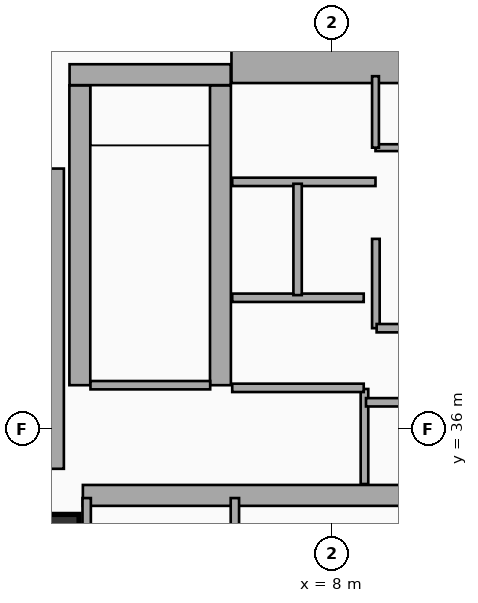
"""IFC4 building model, lengths in metres.
Left out: names, types, materials, properties, quantities, classifications, styles, units other than length and angle.
Written with IfcOpenShell. Run it as: python <this file> out.ifc"""

import sys

from ifc_helpers import new_model, si_unit, direction, frame, frame_2d, origin, origin_2d, place, context, subcontext, project, spatial, rectangle, extrude, element, fill, save


model = new_model("IFC4")
c1 = context("Model", 3, precision=1e-05, world=origin(), true_north=direction((0.0, 1.0)))
c2 = subcontext(c1, "Body", "Model", "MODEL_VIEW")
j1 = project(units=[si_unit("LENGTHUNIT", "METRE"), si_unit("PLANEANGLEUNIT", "RADIAN")], contexts=[c1])
p1 = place(None, origin())
s1 = spatial("IfcSite", under=j1, at=p1, CompositionType="ELEMENT")
p2 = place(p1, origin())
s2 = spatial("IfcBuilding", under=s1, at=p2, CompositionType="ELEMENT")
p3 = place(p2, origin())
s3 = spatial("IfcBuildingStorey", under=s2, at=p3, CompositionType="ELEMENT", Elevation=0.0)
p4 = place(p3, frame((5.36, 45.55, 0.0), z_axis=(0.0, 0.0, 1.0), x_axis=(1.0, 0.0, 0.0)))
e1 = element("IfcWall", 1, at=p4, inside=s3, PredefinedType="SHEAR", context=c2, shape_type="SweptSolid", body=[
    extrude(rectangle(XDim=13.98, YDim=0.9, at=frame_2d((6.99, 0.0))), origin(), (0.0, 0.0, 1.0), 5.94),
])
p5 = place(p3, frame((0.5, 34.95, 0.0), z_axis=(0.0, 0.0, 1.0), x_axis=(0.0, 1.0, 0.0)))
e2 = element("IfcWall", 2, at=p5, inside=s3, PredefinedType="SHEAR", context=c2, shape_type="SweptSolid", body=[
    extrude(rectangle(XDim=7.9, YDim=0.9, at=frame_2d((3.95, 0.0))), origin(), (0.0, 0.0, 1.0), 5.94),
])
p6 = place(p3, frame((1.45, 34.25, 0.0), z_axis=(0.0, 0.0, 1.0), x_axis=(1.0, 0.0, 0.0)))
e3 = element("IfcWall", 3, at=p6, inside=s3, PredefinedType="SHEAR", context=c2, shape_type="SweptSolid", body=[
    extrude(rectangle(XDim=10.71, YDim=0.55, at=frame_2d((5.355, 0.0))), origin(), (0.0, 0.0, 1.0), 5.94),
])
p7 = place(p6, frame((7.25, 0.0, 0.0), z_axis=(0.0, 0.0, 1.0), x_axis=(-1.0, 0.0, 0.0)))
e4 = element("IfcOpeningElement", 4, at=p7, cuts=e3, PredefinedType="OPENING", context=c2, shape_type="SweptSolid", body=[
    extrude(rectangle(XDim=1.1, YDim=2.15, at=frame_2d((0.55, 1.075))), frame((0.0, 0.285, 0.0), z_axis=(0.0, -1.0, 0.0), x_axis=(1.0, 0.0, 0.0)), (0.0, 0.0, 1.0), 0.57),
])
for number, where, z_axis, x_axis in (
    (5, (1.37, 37.15, 0.0), (0.0, 0.0, 1.0), (0.0, 1.0, 0.0)),
    (6, (5.07, 37.15, 0.0), (0.0, 0.0, 1.0), (0.0, 1.0, 0.0)),
):
    element("IfcWall", number, at=place(p3, frame(where, z_axis=z_axis, x_axis=x_axis)), inside=s3, PredefinedType="SHEAR", context=c2, shape_type="SweptSolid", body=[
        extrude(rectangle(XDim=7.89, YDim=0.55, at=frame_2d((3.945, 0.0))), origin(), (0.0, 0.0, 1.0), 5.94),
    ])
p8 = place(p3, frame((1.1, 45.32, 0.0), z_axis=(0.0, 0.0, 1.0), x_axis=(1.0, 0.0, 0.0)))
e7 = element("IfcWall", 7, at=p8, inside=s3, PredefinedType="SHEAR", context=c2, shape_type="SweptSolid", body=[
    extrude(rectangle(XDim=4.24, YDim=0.55, at=frame_2d((2.12, 0.0))), origin(), (0.0, 0.0, 1.0), 5.94),
])
p9 = place(p3, frame((0.8, 33.2, 0.0), z_axis=(0.0, 0.0, 1.0), x_axis=(1.0, 0.0, 0.0)))
e8 = element("IfcColumn", 8, at=p9, inside=s3, PredefinedType="COLUMN", context=c2, shape_type="SweptSolid", body=[
    extrude(rectangle(XDim=1.1, YDim=1.1, at=origin_2d()), origin(), (0.0, 0.0, 1.0), 5.94),
])
p10 = place(p3, frame((1.088, 47.834, 0.0), z_axis=(0.0, 0.0, 1.0), x_axis=(-0.707106781187, -0.707106781187, 0.0)))
e9 = element("IfcWall", 9, at=p10, inside=s3, PredefinedType="SOLIDWALL", context=c2, shape_type="SweptSolid", body=[
    extrude(rectangle(XDim=4.133, YDim=0.36, at=frame_2d((2.066, 0.0))), origin(), (0.0, 0.0, 1.0), 5.62),
])
p11 = place(p3, frame((1.65, 37.15, 0.0), z_axis=(0.0, 0.0, 1.0), x_axis=(1.0, 0.0, 0.0)))
e10 = element("IfcWall", 10, at=p11, inside=s3, PredefinedType="PARTITIONING", context=c2, shape_type="SweptSolid", body=[
    extrude(rectangle(XDim=3.15, YDim=0.22, at=frame_2d((1.575, 0.0))), origin(), (0.0, 0.0, 1.0), 5.62),
])
p12 = place(p11, frame((2.05, 0.0, 0.0), z_axis=(0.0, 0.0, 1.0), x_axis=(-1.0, 0.0, 0.0)))
e11 = element("IfcOpeningElement", 11, at=p12, cuts=e10, PredefinedType="OPENING", context=c2, shape_type="SweptSolid", body=[
    extrude(rectangle(XDim=1.05, YDim=2.15, at=frame_2d((0.525, 1.075))), frame((0.0, 0.12, 0.0), z_axis=(0.0, -1.0, 0.0), x_axis=(1.0, 0.0, 0.0)), (0.0, 0.0, 1.0), 0.24),
])
p13 = place(p3, frame((8.86, 34.55, 0.0), z_axis=(0.0, 0.0, 1.0), x_axis=(0.0, 1.0, 0.0)))
e12 = element("IfcWall", 12, at=p13, inside=s3, PredefinedType="PARTITIONING", context=c2, shape_type="SweptSolid", body=[
    extrude(rectangle(XDim=2.5, YDim=0.2, at=frame_2d((1.25, 0.0))), origin(), (0.0, 0.0, 1.0), 5.62),
])
p14 = place(p3, frame((5.38, 37.08, 0.0), z_axis=(0.0, 0.0, 1.0), x_axis=(1.0, 0.0, 0.0)))
e13 = element("IfcWall", 13, at=p14, inside=s3, PredefinedType="PARTITIONING", context=c2, shape_type="SweptSolid", body=[
    extrude(rectangle(XDim=3.46, YDim=0.22, at=frame_2d((1.73, 0.0))), origin(), (0.0, 0.0, 1.0), 5.62),
])
p15 = place(p14, frame((1.55, 0.0, 0.0), z_axis=(0.0, 0.0, 1.0), x_axis=(-1.0, 0.0, 0.0)))
e14 = element("IfcOpeningElement", 14, at=p15, cuts=e13, PredefinedType="OPENING", context=c2, shape_type="SweptSolid", body=[
    extrude(rectangle(XDim=1.2, YDim=2.2, at=frame_2d((0.6, 1.1))), frame((0.0, 0.12, 0.0), z_axis=(0.0, -1.0, 0.0), x_axis=(1.0, 0.0, 0.0)), (0.0, 0.0, 1.0), 0.24),
])
p16 = place(p14, frame((3.22, 0.0, 0.0), z_axis=(0.0, 0.0, 1.0), x_axis=(-1.0, 0.0, 0.0)))
e15 = element("IfcOpeningElement", 15, at=p16, cuts=e13, PredefinedType="OPENING", context=c2, shape_type="SweptSolid", body=[
    extrude(rectangle(XDim=1.2, YDim=2.2, at=frame_2d((0.6, 1.1))), frame((0.0, 0.12, 0.0), z_axis=(0.0, -1.0, 0.0), x_axis=(1.0, 0.0, 0.0)), (0.0, 0.0, 1.0), 0.24),
])
p17 = place(p3, frame((5.38, 39.45, 0.0), z_axis=(0.0, 0.0, 1.0), x_axis=(1.0, 0.0, 0.0)))
e16 = element("IfcWall", 16, at=p17, inside=s3, PredefinedType="PARTITIONING", context=c2, shape_type="SweptSolid", body=[
    extrude(rectangle(XDim=3.46, YDim=0.22, at=frame_2d((1.73, 0.0))), origin(), (0.0, 0.0, 1.0), 5.62),
])
p18 = place(p3, frame((5.38, 42.5, 0.0), z_axis=(0.0, 0.0, 1.0), x_axis=(1.0, 0.0, 0.0)))
e17 = element("IfcWall", 17, at=p18, inside=s3, PredefinedType="PARTITIONING", context=c2, shape_type="SweptSolid", body=[
    extrude(rectangle(XDim=3.77, YDim=0.22, at=frame_2d((1.885, 0.0))), origin(), (0.0, 0.0, 1.0), 5.62),
])
p19 = place(p18, frame((1.75, 0.0, 0.0), z_axis=(0.0, 0.0, 1.0), x_axis=(-1.0, 0.0, 0.0)))
e18 = element("IfcOpeningElement", 18, at=p19, cuts=e17, PredefinedType="OPENING", context=c2, shape_type="SweptSolid", body=[
    extrude(rectangle(XDim=1.4, YDim=2.2, at=frame_2d((0.7, 1.1))), frame((0.0, 0.12, 0.0), z_axis=(0.0, -1.0, 0.0), x_axis=(1.0, 0.0, 0.0)), (0.0, 0.0, 1.0), 0.24),
])
p20 = place(p18, frame((3.53, 0.0, 0.0), z_axis=(0.0, 0.0, 1.0), x_axis=(-1.0, 0.0, 0.0)))
e19 = element("IfcOpeningElement", 19, at=p20, cuts=e17, PredefinedType="OPENING", context=c2, shape_type="SweptSolid", body=[
    extrude(rectangle(XDim=1.4, YDim=2.2, at=frame_2d((0.7, 1.1))), frame((0.0, 0.12, 0.0), z_axis=(0.0, -1.0, 0.0), x_axis=(1.0, 0.0, 0.0)), (0.0, 0.0, 1.0), 0.24),
])
p21 = place(p3, frame((7.1, 39.52, 0.0), z_axis=(0.0, 0.0, 1.0), x_axis=(0.0, 1.0, 0.0)))
e20 = element("IfcWall", 20, at=p21, inside=s3, PredefinedType="PARTITIONING", context=c2, shape_type="SweptSolid", body=[
    extrude(rectangle(XDim=2.93, YDim=0.22, at=frame_2d((1.465, 0.0))), origin(), (0.0, 0.0, 1.0), 5.62),
])
p22 = place(p21, frame((0.85, 0.0, 0.0)))
e21 = element("IfcOpeningElement", 21, at=p22, cuts=e20, PredefinedType="OPENING", context=c2, shape_type="SweptSolid", body=[
    extrude(rectangle(XDim=1.1, YDim=2.2, at=frame_2d((0.55, 1.1))), frame((0.0, 0.12, 0.0), z_axis=(0.0, -1.0, 0.0), x_axis=(1.0, 0.0, 0.0)), (0.0, 0.0, 1.0), 0.24),
])
for number, where, z_axis, x_axis in (
    (22, (1.55, 31.8, 0.0), (0.0, 0.0, 1.0), (0.0, 1.0, 0.0)),
    (23, (5.45, 31.8, 0.0), (0.0, 0.0, 1.0), (0.0, 1.0, 0.0)),
):
    element("IfcWall", number, at=place(p3, frame(where, z_axis=z_axis, x_axis=x_axis)), inside=s3, PredefinedType="PARTITIONING", context=c2, shape_type="SweptSolid", body=[
        extrude(rectangle(XDim=2.38, YDim=0.22, at=frame_2d((1.19, 0.0))), origin(), (0.0, 0.0, 1.0), 5.62),
    ])
p23 = place(p3, frame((9.16, 38.65, 0.0), z_axis=(0.0, 0.0, 1.0), x_axis=(0.0, 1.0, 0.0)))
e24 = element("IfcWall", 24, at=p23, inside=s3, PredefinedType="PARTITIONING", context=c2, shape_type="SweptSolid", body=[
    extrude(rectangle(XDim=2.35, YDim=0.2, at=frame_2d((1.175, 0.0))), origin(), (0.0, 0.0, 1.0), 5.62),
])
p24 = place(p3, frame((8.9, 36.7, 0.0), z_axis=(0.0, 0.0, 1.0), x_axis=(1.0, 0.0, 0.0)))
e25 = element("IfcWall", 25, at=p24, inside=s3, PredefinedType="PARTITIONING", context=c2, shape_type="SweptSolid", body=[
    extrude(rectangle(XDim=3.26, YDim=0.22, at=frame_2d((1.63, 0.0))), origin(), (0.0, 0.0, 1.0), 5.62),
])
p25 = place(p24, frame((0.26, 0.0, 0.0)))
e26 = element("IfcOpeningElement", 26, at=p25, cuts=e25, PredefinedType="OPENING", context=c2, shape_type="SweptSolid", body=[
    extrude(rectangle(XDim=1.1, YDim=2.2, at=frame_2d((0.55, 1.1))), frame((0.0, 0.12, 0.0), z_axis=(0.0, -1.0, 0.0), x_axis=(1.0, 0.0, 0.0)), (0.0, 0.0, 1.0), 0.24),
])
p26 = place(p24, frame((1.88, 0.0, 0.0)))
e27 = element("IfcOpeningElement", 27, at=p26, cuts=e25, PredefinedType="OPENING", context=c2, shape_type="SweptSolid", body=[
    extrude(rectangle(XDim=1.1, YDim=2.2, at=frame_2d((0.55, 1.1))), frame((0.0, 0.12, 0.0), z_axis=(0.0, -1.0, 0.0), x_axis=(1.0, 0.0, 0.0)), (0.0, 0.0, 1.0), 0.24),
])
p27 = place(p3, frame((9.18, 38.65, 0.0), z_axis=(0.0, 0.0, 1.0), x_axis=(1.0, 0.0, 0.0)))
e28 = element("IfcWall", 28, at=p27, inside=s3, PredefinedType="PARTITIONING", context=c2, shape_type="SweptSolid", body=[
    extrude(rectangle(XDim=3.38, YDim=0.22, at=frame_2d((1.69, 0.0))), origin(), (0.0, 0.0, 1.0), 5.62),
])
p28 = place(p27, frame((0.3, 0.0, 0.0)))
e29 = element("IfcOpeningElement", 29, at=p28, cuts=e28, PredefinedType="OPENING", context=c2, shape_type="SweptSolid", body=[
    extrude(rectangle(XDim=1.1, YDim=2.2, at=frame_2d((0.55, 1.1))), frame((0.0, 0.12, 0.0), z_axis=(0.0, -1.0, 0.0), x_axis=(1.0, 0.0, 0.0)), (0.0, 0.0, 1.0), 0.24),
])
p29 = place(p27, frame((1.95, 0.0, 0.0)))
e30 = element("IfcOpeningElement", 30, at=p29, cuts=e28, PredefinedType="OPENING", context=c2, shape_type="SweptSolid", body=[
    extrude(rectangle(XDim=1.1, YDim=2.2, at=frame_2d((0.55, 1.1))), frame((0.0, 0.12, 0.0), z_axis=(0.0, -1.0, 0.0), x_axis=(1.0, 0.0, 0.0)), (0.0, 0.0, 1.0), 0.24),
])
p30 = place(p3, frame((9.15, 43.4, 0.0), z_axis=(0.0, 0.0, 1.0), x_axis=(1.0, 0.0, 0.0)))
e31 = element("IfcWall", 31, at=p30, inside=s3, PredefinedType="PLUMBINGWALL", context=c2, shape_type="SweptSolid", body=[
    extrude(rectangle(XDim=9.33, YDim=0.18, at=frame_2d((4.665, 0.0))), origin(), (0.0, 0.0, 1.0), 5.62),
])
p31 = place(p30, frame((1.88, 0.0, 0.0)))
e32 = element("IfcOpeningElement", 32, at=p31, cuts=e31, PredefinedType="OPENING", context=c2, shape_type="SweptSolid", body=[
    extrude(rectangle(XDim=0.92, YDim=2.1, at=frame_2d((0.46, 1.05))), frame((0.0, 0.1, 0.0), z_axis=(0.0, -1.0, 0.0), x_axis=(1.0, 0.0, 0.0)), (0.0, 0.0, 1.0), 0.2),
])
p32 = place(p30, frame((6.515, 0.0, 0.0)))
e33 = element("IfcOpeningElement", 33, at=p32, cuts=e31, PredefinedType="OPENING", context=c2, shape_type="SweptSolid", body=[
    extrude(rectangle(XDim=0.92, YDim=2.1, at=frame_2d((0.46, 1.05))), frame((0.0, 0.1, 0.0), z_axis=(0.0, -1.0, 0.0), x_axis=(1.0, 0.0, 0.0)), (0.0, 0.0, 1.0), 0.2),
])
p33 = place(p3, frame((9.15, 43.4, 0.0), z_axis=(0.0, 0.0, 1.0), x_axis=(0.0, 1.0, 0.0)))
e34 = element("IfcWall", 34, at=p33, inside=s3, PredefinedType="PLUMBINGWALL", context=c2, shape_type="SweptSolid", body=[
    extrude(rectangle(XDim=1.88, YDim=0.18, at=frame_2d((0.94, 0.0))), origin(), (0.0, 0.0, 1.0), 5.62),
])
p34 = place(p12, origin())
e35 = element("IfcDoor", 35, at=p34, inside=s3, OperationType="SINGLE_SWING_RIGHT", PredefinedType="DOOR", context=c2, shape_type="SweptSolid", body=[
    extrude(rectangle(XDim=1.05, YDim=2.15, at=frame_2d((0.525, 1.075))), frame((0.0, 0.025, 0.0), z_axis=(0.0, -1.0, 0.0), x_axis=(1.0, 0.0, 0.0)), (0.0, 0.0, 1.0), 0.05),
])
fill(e11, e35)
p35 = place(p7, origin())
e36 = element("IfcDoor", 36, at=p35, inside=s3, OperationType="SINGLE_SWING_LEFT", PredefinedType="DOOR", context=c2, shape_type="SweptSolid", body=[
    extrude(rectangle(XDim=1.1, YDim=2.15, at=frame_2d((0.55, 1.075))), frame((0.0, 0.025, 0.0), z_axis=(0.0, -1.0, 0.0), x_axis=(1.0, 0.0, 0.0)), (0.0, 0.0, 1.0), 0.05),
])
fill(e4, e36)
p36 = place(p15, origin())
e37 = element("IfcDoor", 37, at=p36, inside=s3, OperationType="SLIDING_TO_RIGHT", PredefinedType="DOOR", context=c2, shape_type="SweptSolid", body=[
    extrude(rectangle(XDim=1.2, YDim=2.2, at=frame_2d((0.6, 1.1))), frame((0.0, 0.025, 0.0), z_axis=(0.0, -1.0, 0.0), x_axis=(1.0, 0.0, 0.0)), (0.0, 0.0, 1.0), 0.05),
])
fill(e14, e37)
p37 = place(p16, origin())
e38 = element("IfcDoor", 38, at=p37, inside=s3, OperationType="SLIDING_TO_RIGHT", PredefinedType="DOOR", context=c2, shape_type="SweptSolid", body=[
    extrude(rectangle(XDim=1.2, YDim=2.2, at=frame_2d((0.6, 1.1))), frame((0.0, 0.025, 0.0), z_axis=(0.0, -1.0, 0.0), x_axis=(1.0, 0.0, 0.0)), (0.0, 0.0, 1.0), 0.05),
])
fill(e15, e38)
p38 = place(p19, origin())
e39 = element("IfcDoor", 39, at=p38, inside=s3, OperationType="SLIDING_TO_LEFT", PredefinedType="DOOR", context=c2, shape_type="SweptSolid", body=[
    extrude(rectangle(XDim=1.4, YDim=2.2, at=frame_2d((0.7, 1.1))), frame((0.0, 0.025, 0.0), z_axis=(0.0, -1.0, 0.0), x_axis=(1.0, 0.0, 0.0)), (0.0, 0.0, 1.0), 0.05),
])
fill(e18, e39)
p39 = place(p20, origin())
e40 = element("IfcDoor", 40, at=p39, inside=s3, OperationType="SLIDING_TO_LEFT", PredefinedType="DOOR", context=c2, shape_type="SweptSolid", body=[
    extrude(rectangle(XDim=1.4, YDim=2.2, at=frame_2d((0.7, 1.1))), frame((0.0, 0.025, 0.0), z_axis=(0.0, -1.0, 0.0), x_axis=(1.0, 0.0, 0.0)), (0.0, 0.0, 1.0), 0.05),
])
fill(e19, e40)
p40 = place(p22, origin())
e41 = element("IfcDoor", 41, at=p40, inside=s3, OperationType="SLIDING_TO_LEFT", PredefinedType="DOOR", context=c2, shape_type="SweptSolid", body=[
    extrude(rectangle(XDim=1.1, YDim=2.2, at=frame_2d((0.55, 1.1))), frame((0.0, 0.025, 0.0), z_axis=(0.0, -1.0, 0.0), x_axis=(1.0, 0.0, 0.0)), (0.0, 0.0, 1.0), 0.05),
])
fill(e21, e41)
p41 = place(p25, origin())
e42 = element("IfcDoor", 42, at=p41, inside=s3, OperationType="SLIDING_TO_LEFT", PredefinedType="DOOR", context=c2, shape_type="SweptSolid", body=[
    extrude(rectangle(XDim=1.1, YDim=2.2, at=frame_2d((0.55, 1.1))), frame((0.0, 0.025, 0.0), z_axis=(0.0, -1.0, 0.0), x_axis=(1.0, 0.0, 0.0)), (0.0, 0.0, 1.0), 0.05),
])
fill(e26, e42)
p42 = place(p28, origin())
e43 = element("IfcDoor", 43, at=p42, inside=s3, OperationType="SLIDING_TO_LEFT", PredefinedType="DOOR", context=c2, shape_type="SweptSolid", body=[
    extrude(rectangle(XDim=1.1, YDim=2.2, at=frame_2d((0.55, 1.1))), frame((0.0, 0.025, 0.0), z_axis=(0.0, -1.0, 0.0), x_axis=(1.0, 0.0, 0.0)), (0.0, 0.0, 1.0), 0.05),
])
fill(e29, e43)
save(model, sys.argv[1])
